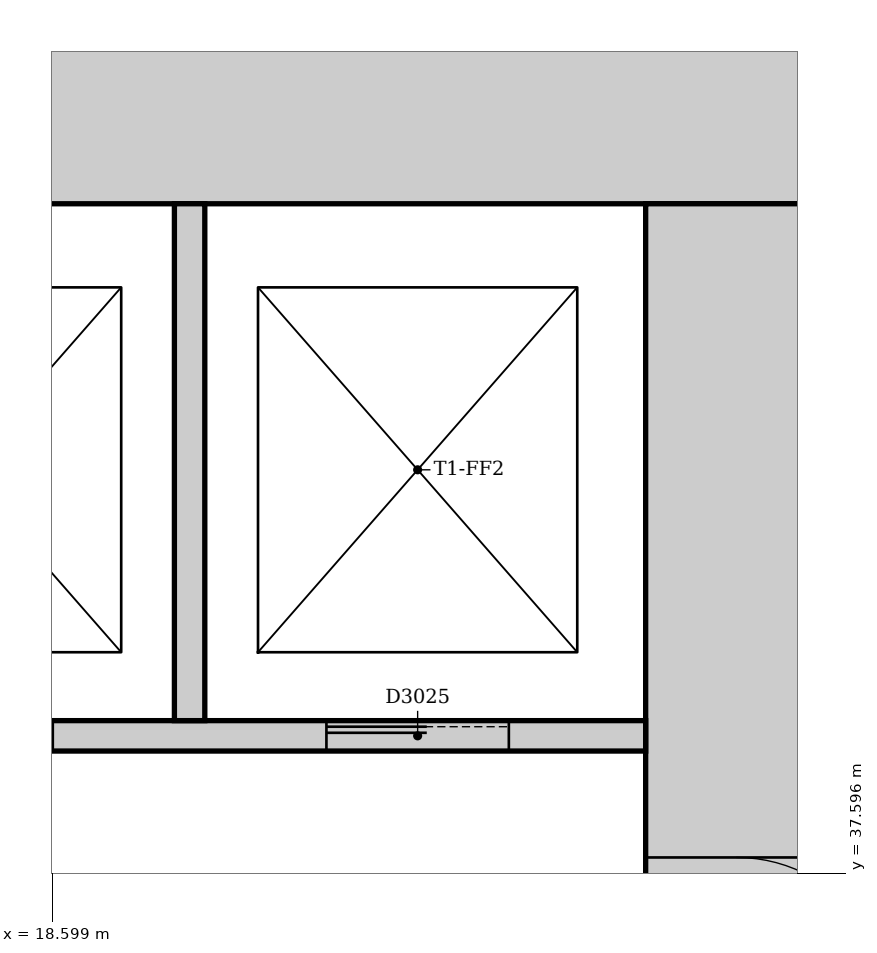
"""IFC4 building model, lengths in metres.
Left out: names, types, materials, properties, quantities, classifications, styles, units other than length and angle.
Written with IfcOpenShell. Run it as: python <this file> out.ifc"""

import sys

from ifc_helpers import new_model, si_unit, direction, frame, frame_2d, origin, place, context, subcontext, project, spatial, rectangle, extrude, element, fill, save


model = new_model("IFC4")
c1 = context("Model", 3, precision=1e-05, world=origin(), true_north=direction((0.0, 1.0)))
c2 = subcontext(c1, "Body", "Model", "MODEL_VIEW")
j1 = project(units=[si_unit("LENGTHUNIT", "METRE"), si_unit("PLANEANGLEUNIT", "RADIAN")], contexts=[c1])
p1 = place(None, origin())
s1 = spatial("IfcSite", under=j1, at=p1, CompositionType="ELEMENT")
p2 = place(p1, origin())
s2 = spatial("IfcBuilding", under=s1, at=p2, CompositionType="ELEMENT")
p3 = place(p2, frame((0.0, 0.0, -9.5)))
s3 = spatial("IfcBuildingStorey", under=s2, at=p3, CompositionType="ELEMENT", Elevation=-9.5)
p4 = place(p3, frame((23.7, 42.6, 0.0), z_axis=(0.0, 0.0, 1.0), x_axis=(-1.0, 0.0, 0.0)))
e1 = element("IfcWall", 1, at=p4, inside=s3, PredefinedType="SOLIDWALL", context=c2, shape_type="SweptSolid", body=[
    extrude(rectangle(XDim=19.8, YDim=1.2, at=frame_2d((9.9, 0.0))), origin(), (0.0, 0.0, 1.0), 4.5),
])
p5 = place(p3, frame((23.1, 31.5, 0.0), z_axis=(0.0, 0.0, 1.0), x_axis=(0.0, 1.0, 0.0)))
e2 = element("IfcWall", 2, at=p5, inside=s3, PredefinedType="SOLIDWALL", context=c2, shape_type="SweptSolid", body=[
    extrude(rectangle(XDim=10.5, YDim=1.2, at=frame_2d((5.25, 0.0))), origin(), (0.0, 0.0, 1.0), 4.5),
])
p6 = place(p5, frame((3.15, 0.0, 0.0)))
e3 = element("IfcOpeningElement", 3, at=p6, cuts=e2, PredefinedType="OPENING", context=c2, shape_type="SweptSolid", body=[
    extrude(rectangle(XDim=1.0, YDim=2.1, at=frame_2d((0.5, 1.05))), frame((0.0, 0.61, 0.0), z_axis=(0.0, -1.0, 0.0), x_axis=(1.0, 0.0, 0.0)), (0.0, 0.0, 1.0), 1.22),
])
p7 = place(p5, frame((5.2, 0.0, 0.0)))
e4 = element("IfcOpeningElement", 4, at=p7, cuts=e2, PredefinedType="OPENING", context=c2, shape_type="SweptSolid", body=[
    extrude(rectangle(XDim=1.0, YDim=2.1, at=frame_2d((0.5, 1.05))), frame((0.0, 0.61, 0.0), z_axis=(0.0, -1.0, 0.0), x_axis=(1.0, 0.0, 0.0)), (0.0, 0.0, 1.0), 1.22),
])
p8 = place(p3, frame((16.4, 38.5, 0.0), z_axis=(0.0, 0.0, 1.0), x_axis=(1.0, 0.0, 0.0)))
e5 = element("IfcWall", 5, at=p8, inside=s3, PredefinedType="PARTITIONING", context=c2, shape_type="SweptSolid", body=[
    extrude(rectangle(XDim=6.1, YDim=0.2, at=frame_2d((3.05, 0.0))), origin(), (0.0, 0.0, 1.0), 4.15),
])
p9 = place(p8, frame((1.0, 0.0, 0.0)))
e6 = element("IfcOpeningElement", 6, at=p9, cuts=e5, PredefinedType="OPENING", context=c2, shape_type="SweptSolid", body=[
    extrude(rectangle(XDim=1.2, YDim=2.1, at=frame_2d((0.6, 1.05))), frame((0.0, 0.11, 0.0), z_axis=(0.0, -1.0, 0.0), x_axis=(1.0, 0.0, 0.0)), (0.0, 0.0, 1.0), 0.22),
])
p10 = place(p8, frame((4.0, 0.0, 0.0)))
e7 = element("IfcOpeningElement", 7, at=p10, cuts=e5, PredefinedType="OPENING", context=c2, shape_type="SweptSolid", body=[
    extrude(rectangle(XDim=1.2, YDim=2.1, at=frame_2d((0.6, 1.05))), frame((0.0, 0.11, 0.0), z_axis=(0.0, -1.0, 0.0), x_axis=(1.0, 0.0, 0.0)), (0.0, 0.0, 1.0), 0.22),
])
p11 = place(p3, frame((19.5, 38.6, 0.0), z_axis=(0.0, 0.0, 1.0), x_axis=(0.0, 1.0, 0.0)))
e8 = element("IfcWall", 8, at=p11, inside=s3, PredefinedType="PARTITIONING", context=c2, shape_type="SweptSolid", body=[
    extrude(rectangle(XDim=3.4, YDim=0.2, at=frame_2d((1.7, 0.0))), origin(), (0.0, 0.0, 1.0), 4.15),
])
p12 = place(p10, origin())
e9 = element("IfcDoor", 9, at=p12, inside=s3, OperationType="SLIDING_TO_LEFT", PredefinedType="DOOR", context=c2, shape_type="SweptSolid", body=[
    extrude(rectangle(XDim=1.2, YDim=2.1, at=frame_2d((0.6, 1.05))), frame((0.0, 0.025, 0.0), z_axis=(0.0, -1.0, 0.0), x_axis=(1.0, 0.0, 0.0)), (0.0, 0.0, 1.0), 0.05),
])
fill(e7, e9)
p13 = place(p7, frame((1.0, 0.0, 0.0), z_axis=(0.0, 0.0, 1.0), x_axis=(-1.0, 0.0, 0.0)))
e10 = element("IfcDoor", 10, at=p13, inside=s3, OperationType="SINGLE_SWING_RIGHT", PredefinedType="DOOR", context=c2, shape_type="SweptSolid", body=[
    extrude(rectangle(XDim=1.0, YDim=2.1, at=frame_2d((0.5, 1.05))), frame((0.0, 0.025, 0.0), z_axis=(0.0, -1.0, 0.0), x_axis=(1.0, 0.0, 0.0)), (0.0, 0.0, 1.0), 0.05),
])
fill(e4, e10)
save(model, sys.argv[1])
